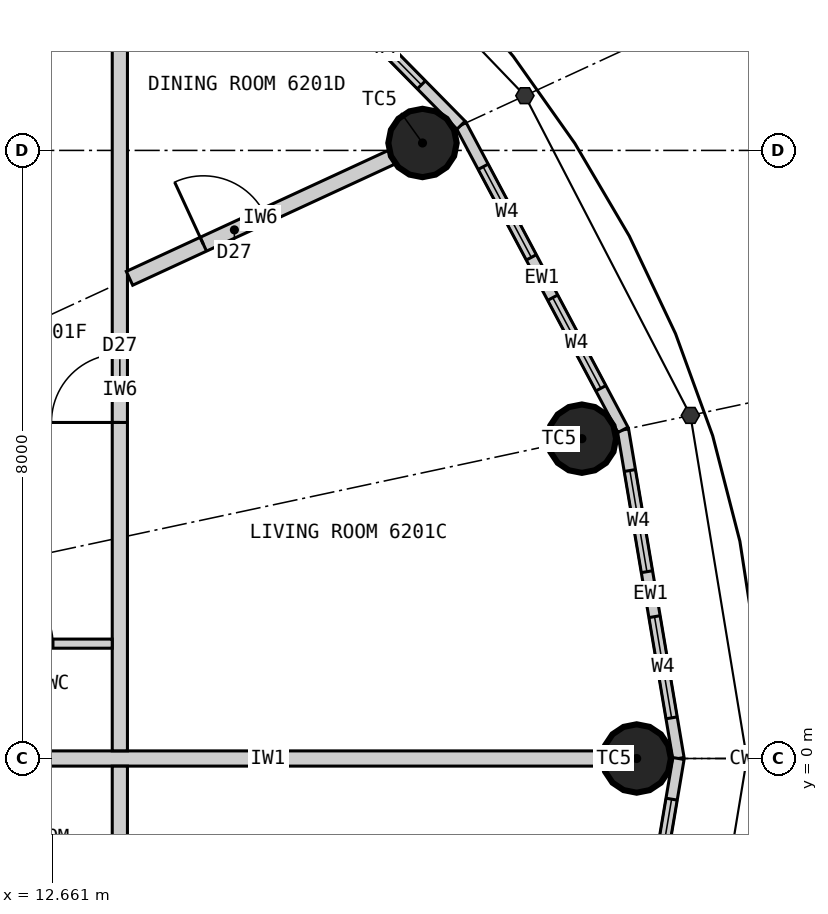
"""IFC4 building model, lengths in metres.
Left out: names, types, materials, properties, quantities, classifications, styles, units other than length and angle.
Written with IfcOpenShell. Run it as: python <this file> out.ifc"""

import sys

from ifc_helpers import new_model, si_unit, direction, frame, frame_2d, origin, origin_2d, place, context, subcontext, project, spatial, rectangle, circle, extrude, clip, halfspace, element, fill, save


model = new_model("IFC4")
c1 = context("Model", 3, precision=1e-05, world=origin(), true_north=direction((0.0, 1.0)))
c2 = subcontext(c1, "Body", "Model", "MODEL_VIEW")
j1 = project(units=[si_unit("LENGTHUNIT", "METRE"), si_unit("PLANEANGLEUNIT", "RADIAN")], contexts=[c1])
p1 = place(None, origin())
s1 = spatial("IfcSite", under=j1, at=p1, CompositionType="ELEMENT")
p2 = place(p1, origin())
s2 = spatial("IfcBuilding", under=s1, at=p2, CompositionType="ELEMENT")
p3 = place(p2, frame((0.0, 0.0, 229.2)))
s3 = spatial("IfcBuildingStorey", under=s2, at=p3, CompositionType="ELEMENT", Elevation=229.2)
for number, where, z_axis, x_axis in (
    (1, (20.35, 0.0, 0.0), (0.0, 0.0, 1.0), (1.0, 0.0, 0.0)),
    (2, (19.629, 4.208, 0.0), (0.0, 0.0, 1.0), (1.0, 0.0, 0.0)),
    (3, (17.532, 8.098, 0.0), (0.0, 0.0, 1.0), (1.0, 0.0, 0.0)),
):
    element("IfcColumn", number, at=place(p3, frame(where, z_axis=z_axis, x_axis=x_axis)), inside=s3, PredefinedType="COLUMN", context=c2, shape_type="Clipping", body=[
        clip(extrude(circle(Radius=0.45, at=origin_2d()), origin(), (0.0, 0.0, 1.0), 3.3), halfspace(frame((0.0, 0.0, 2.25), z_axis=(0.0, 0.0, 1.0), x_axis=(1.0, 0.0, 0.0)), False)),
    ])
p4 = place(p3, frame((20.9, 0.0, 0.0), z_axis=(0.0, 0.0, 1.0), x_axis=(-0.166538513568, 0.986034950445, 0.0)))
e4 = element("IfcWall", 4, at=p4, inside=s3, PredefinedType="ELEMENTEDWALL", context=c2, shape_type="SweptSolid", body=[
    extrude(rectangle(XDim=4.385, YDim=0.15, at=frame_2d((2.192, 0.0))), origin(), (0.0, 0.0, 1.0), 3.05),
])
p5 = place(p4, frame((0.542, 0.0, 0.9)))
e5 = element("IfcOpeningElement", 5, at=p5, cuts=e4, PredefinedType="OPENING", context=c2, shape_type="SweptSolid", body=[
    extrude(rectangle(XDim=1.35, YDim=1.9, at=frame_2d((0.675, 0.95))), frame((0.0, 0.085, 0.0), z_axis=(0.0, -1.0, 0.0), x_axis=(1.0, 0.0, 0.0)), (0.0, 0.0, 1.0), 0.17),
])
p6 = place(p4, frame((2.492, 0.0, 0.9)))
e6 = element("IfcOpeningElement", 6, at=p6, cuts=e4, PredefinedType="OPENING", context=c2, shape_type="SweptSolid", body=[
    extrude(rectangle(XDim=1.35, YDim=1.9, at=frame_2d((0.675, 0.95))), frame((0.0, 0.085, 0.0), z_axis=(0.0, -1.0, 0.0), x_axis=(1.0, 0.0, 0.0)), (0.0, 0.0, 1.0), 0.17),
])
p7 = place(p3, frame((20.17, 4.323, 0.0), z_axis=(0.0, 0.0, 1.0), x_axis=(-0.469256152955, 0.883062094597, 0.0)))
e7 = element("IfcWall", 7, at=p7, inside=s3, PredefinedType="ELEMENTEDWALL", context=c2, shape_type="SweptSolid", body=[
    extrude(rectangle(XDim=4.539, YDim=0.15, at=frame_2d((2.27, 0.0))), origin(), (0.0, 0.0, 1.0), 3.05),
])
p8 = place(p7, frame((0.62, 0.0, 0.9)))
e8 = element("IfcOpeningElement", 8, at=p8, cuts=e7, PredefinedType="OPENING", context=c2, shape_type="SweptSolid", body=[
    extrude(rectangle(XDim=1.35, YDim=1.9, at=frame_2d((0.675, 0.95))), frame((0.0, 0.085, 0.0), z_axis=(0.0, -1.0, 0.0), x_axis=(1.0, 0.0, 0.0)), (0.0, 0.0, 1.0), 0.17),
])
p9 = place(p7, frame((2.57, 0.0, 0.9)))
e9 = element("IfcOpeningElement", 9, at=p9, cuts=e7, PredefinedType="OPENING", context=c2, shape_type="SweptSolid", body=[
    extrude(rectangle(XDim=1.35, YDim=1.9, at=frame_2d((0.675, 0.95))), frame((0.0, 0.085, 0.0), z_axis=(0.0, -1.0, 0.0), x_axis=(1.0, 0.0, 0.0)), (0.0, 0.0, 1.0), 0.17),
])
p10 = place(p3, frame((18.04, 8.332, 0.0), z_axis=(0.0, 0.0, 1.0), x_axis=(-0.701527379618, 0.712642501993, 0.0)))
e10 = element("IfcWall", 10, at=p10, inside=s3, PredefinedType="ELEMENTEDWALL", context=c2, shape_type="SweptSolid", body=[
    extrude(rectangle(XDim=4.788, YDim=0.15, at=frame_2d((2.394, 0.0))), origin(), (0.0, 0.0, 1.0), 3.05),
])
p11 = place(p10, frame((0.744, 0.0, 0.9)))
e11 = element("IfcOpeningElement", 11, at=p11, cuts=e10, PredefinedType="OPENING", context=c2, shape_type="SweptSolid", body=[
    extrude(rectangle(XDim=1.35, YDim=1.9, at=frame_2d((0.675, 0.95))), frame((0.0, 0.085, 0.0), z_axis=(0.0, -1.0, 0.0), x_axis=(1.0, 0.0, 0.0)), (0.0, 0.0, 1.0), 0.17),
])
p12 = place(p10, frame((2.694, 0.0, 0.9)))
e12 = element("IfcOpeningElement", 12, at=p12, cuts=e10, PredefinedType="OPENING", context=c2, shape_type="SweptSolid", body=[
    extrude(rectangle(XDim=1.35, YDim=1.9, at=frame_2d((0.675, 0.95))), frame((0.0, 0.085, 0.0), z_axis=(0.0, -1.0, 0.0), x_axis=(1.0, 0.0, 0.0)), (0.0, 0.0, 1.0), 0.17),
])
p13 = place(p3, frame((20.17, -4.323, 0.0), z_axis=(0.0, 0.0, 1.0), x_axis=(0.166538513568, 0.986034950445, 0.0)))
e13 = element("IfcWall", 13, at=p13, inside=s3, PredefinedType="ELEMENTEDWALL", context=c2, shape_type="SweptSolid", body=[
    extrude(rectangle(XDim=4.385, YDim=0.15, at=frame_2d((2.192, 0.0))), origin(), (0.0, 0.0, 1.0), 3.05),
])
p14 = place(p13, frame((0.542, 0.0, 0.9)))
e14 = element("IfcOpeningElement", 14, at=p14, cuts=e13, PredefinedType="OPENING", context=c2, shape_type="SweptSolid", body=[
    extrude(rectangle(XDim=1.35, YDim=1.9, at=frame_2d((0.675, 0.95))), frame((0.0, 0.085, 0.0), z_axis=(0.0, -1.0, 0.0), x_axis=(1.0, 0.0, 0.0)), (0.0, 0.0, 1.0), 0.17),
])
p15 = place(p13, frame((2.492, 0.0, 0.9)))
e15 = element("IfcOpeningElement", 15, at=p15, cuts=e13, PredefinedType="OPENING", context=c2, shape_type="SweptSolid", body=[
    extrude(rectangle(XDim=1.35, YDim=1.9, at=frame_2d((0.675, 0.95))), frame((0.0, 0.085, 0.0), z_axis=(0.0, -1.0, 0.0), x_axis=(1.0, 0.0, 0.0)), (0.0, 0.0, 1.0), 0.17),
])
p16 = place(p3, frame((11.1, 0.0, 0.0), z_axis=(0.0, 0.0, 1.0), x_axis=(1.0, 0.0, 0.0)))
e16 = element("IfcWall", 16, at=p16, inside=s3, PredefinedType="PARTITIONING", context=c2, shape_type="SweptSolid", body=[
    extrude(rectangle(XDim=8.8, YDim=0.2, at=frame_2d((4.4, 0.0))), origin(), (0.0, 0.0, 1.0), 2.15),
])
p17 = place(p3, frame((13.55, 0.101, 0.0), z_axis=(0.0, 0.0, 1.0), x_axis=(0.0, 1.0, 0.0)))
e17 = element("IfcWall", 17, at=p17, inside=s3, PredefinedType="PARTITIONING", context=c2, shape_type="SweptSolid", body=[
    extrude(rectangle(XDim=9.508, YDim=0.2, at=frame_2d((4.754, 0.0))), origin(), (0.0, 0.0, 1.0), 3.05),
])
p18 = place(p17, frame((4.32, 0.0, 0.0)))
e18 = element("IfcOpeningElement", 18, at=p18, cuts=e17, PredefinedType="OPENING", context=c2, shape_type="SweptSolid", body=[
    extrude(rectangle(XDim=0.9, YDim=2.1, at=frame_2d((0.45, 1.05))), frame((0.0, 0.11, 0.0), z_axis=(0.0, -1.0, 0.0), x_axis=(1.0, 0.0, 0.0)), (0.0, 0.0, 1.0), 0.22),
])
p19 = place(p3, frame((13.677, 6.317, 0.0), z_axis=(0.0, 0.0, 1.0), x_axis=(0.907825704695, 0.419347695708, 0.0)))
e19 = element("IfcWall", 19, at=p19, inside=s3, PredefinedType="PARTITIONING", context=c2, shape_type="SweptSolid", body=[
    extrude(rectangle(XDim=3.796, YDim=0.2, at=frame_2d((1.898, 0.0))), origin(), (0.0, 0.0, 1.0), 2.15),
])
p20 = place(p19, frame((1.07, 0.0, 0.0)))
e20 = element("IfcOpeningElement", 20, at=p20, cuts=e19, PredefinedType="OPENING", context=c2, shape_type="SweptSolid", body=[
    extrude(rectangle(XDim=0.9, YDim=2.1, at=frame_2d((0.45, 1.05))), frame((0.0, 0.11, 0.0), z_axis=(0.0, -1.0, 0.0), x_axis=(1.0, 0.0, 0.0)), (0.0, 0.0, 1.0), 0.22),
])
p21 = place(p3, frame((11.1, 1.511, 0.0), z_axis=(0.0, 0.0, 1.0), x_axis=(1.0, 0.0, 0.0)))
e21 = element("IfcWall", 21, at=p21, inside=s3, PredefinedType="PARTITIONING", context=c2, shape_type="SweptSolid", body=[
    extrude(rectangle(XDim=2.35, YDim=0.12, at=frame_2d((1.175, 0.0))), origin(), (0.0, 0.0, 1.0), 2.3),
])
p22 = place(p21, frame((0.77, 0.0, 0.0)))
e22 = element("IfcOpeningElement", 22, at=p22, cuts=e21, PredefinedType="OPENING", context=c2, shape_type="SweptSolid", body=[
    extrude(rectangle(XDim=0.8, YDim=2.1, at=frame_2d((0.4, 1.05))), frame((0.0, 0.07, 0.0), z_axis=(0.0, -1.0, 0.0), x_axis=(1.0, 0.0, 0.0)), (0.0, 0.0, 1.0), 0.14),
])
p23 = place(p3, frame((13.55, -9.609, 0.0), z_axis=(0.0, 0.0, 1.0), x_axis=(0.0, 1.0, 0.0)))
e23 = element("IfcWall", 23, at=p23, inside=s3, PredefinedType="PARTITIONING", context=c2, shape_type="SweptSolid", body=[
    extrude(rectangle(XDim=9.508, YDim=0.2, at=frame_2d((4.754, 0.0))), origin(), (0.0, 0.0, 1.0), 3.05),
])
p24 = place(p23, frame((3.77, 0.0, 0.0)))
e24 = element("IfcOpeningElement", 24, at=p24, cuts=e23, PredefinedType="OPENING", context=c2, shape_type="SweptSolid", body=[
    extrude(rectangle(XDim=0.9, YDim=2.1, at=frame_2d((0.45, 1.05))), frame((0.0, 0.11, 0.0), z_axis=(0.0, -1.0, 0.0), x_axis=(1.0, 0.0, 0.0)), (0.0, 0.0, 1.0), 0.22),
])
p25 = place(p23, frame((5.588, 0.0, 0.0)))
e25 = element("IfcOpeningElement", 25, at=p25, cuts=e23, PredefinedType="OPENING", context=c2, shape_type="SweptSolid", body=[
    extrude(rectangle(XDim=0.9, YDim=2.1, at=frame_2d((0.45, 1.05))), frame((0.0, 0.11, 0.0), z_axis=(0.0, -1.0, 0.0), x_axis=(1.0, 0.0, 0.0)), (0.0, 0.0, 1.0), 0.22),
])
p26 = place(p23, frame((7.308, 0.0, 0.0)))
e26 = element("IfcOpeningElement", 26, at=p26, cuts=e23, PredefinedType="OPENING", context=c2, shape_type="SweptSolid", body=[
    extrude(rectangle(XDim=0.8, YDim=2.1, at=frame_2d((0.4, 1.05))), frame((0.0, 0.11, 0.0), z_axis=(0.0, -1.0, 0.0), x_axis=(1.0, 0.0, 0.0)), (0.0, 0.0, 1.0), 0.22),
])
p27 = place(p5, origin())
e27 = element("IfcWindow", 27, at=p27, inside=s3, PartitioningType="SINGLE_PANEL", PredefinedType="WINDOW", context=c2, shape_type="SweptSolid", body=[
    extrude(rectangle(XDim=1.35, YDim=1.9, at=frame_2d((0.675, 0.95))), frame((0.0, 0.03, 0.0), z_axis=(0.0, -1.0, 0.0), x_axis=(1.0, 0.0, 0.0)), (0.0, 0.0, 1.0), 0.06),
])
fill(e5, e27)
p28 = place(p6, origin())
e28 = element("IfcWindow", 28, at=p28, inside=s3, PartitioningType="SINGLE_PANEL", PredefinedType="WINDOW", context=c2, shape_type="SweptSolid", body=[
    extrude(rectangle(XDim=1.35, YDim=1.9, at=frame_2d((0.675, 0.95))), frame((0.0, 0.03, 0.0), z_axis=(0.0, -1.0, 0.0), x_axis=(1.0, 0.0, 0.0)), (0.0, 0.0, 1.0), 0.06),
])
fill(e6, e28)
p29 = place(p8, origin())
e29 = element("IfcWindow", 29, at=p29, inside=s3, PartitioningType="SINGLE_PANEL", PredefinedType="WINDOW", context=c2, shape_type="SweptSolid", body=[
    extrude(rectangle(XDim=1.35, YDim=1.9, at=frame_2d((0.675, 0.95))), frame((0.0, 0.03, 0.0), z_axis=(0.0, -1.0, 0.0), x_axis=(1.0, 0.0, 0.0)), (0.0, 0.0, 1.0), 0.06),
])
fill(e8, e29)
p30 = place(p9, origin())
e30 = element("IfcWindow", 30, at=p30, inside=s3, PartitioningType="SINGLE_PANEL", PredefinedType="WINDOW", context=c2, shape_type="SweptSolid", body=[
    extrude(rectangle(XDim=1.35, YDim=1.9, at=frame_2d((0.675, 0.95))), frame((0.0, 0.03, 0.0), z_axis=(0.0, -1.0, 0.0), x_axis=(1.0, 0.0, 0.0)), (0.0, 0.0, 1.0), 0.06),
])
fill(e9, e30)
p31 = place(p11, origin())
e31 = element("IfcWindow", 31, at=p31, inside=s3, PartitioningType="SINGLE_PANEL", PredefinedType="WINDOW", context=c2, shape_type="SweptSolid", body=[
    extrude(rectangle(XDim=1.35, YDim=1.9, at=frame_2d((0.675, 0.95))), frame((0.0, 0.03, 0.0), z_axis=(0.0, -1.0, 0.0), x_axis=(1.0, 0.0, 0.0)), (0.0, 0.0, 1.0), 0.06),
])
fill(e11, e31)
p32 = place(p15, origin())
e32 = element("IfcWindow", 32, at=p32, inside=s3, PartitioningType="SINGLE_PANEL", PredefinedType="WINDOW", context=c2, shape_type="SweptSolid", body=[
    extrude(rectangle(XDim=1.35, YDim=1.9, at=frame_2d((0.675, 0.95))), frame((0.0, 0.03, 0.0), z_axis=(0.0, -1.0, 0.0), x_axis=(1.0, 0.0, 0.0)), (0.0, 0.0, 1.0), 0.06),
])
fill(e15, e32)
p33 = place(p22, origin())
e33 = element("IfcDoor", 33, at=p33, inside=s3, OperationType="SINGLE_SWING_LEFT", PredefinedType="DOOR", context=c2, shape_type="SweptSolid", body=[
    extrude(rectangle(XDim=0.8, YDim=2.1, at=frame_2d((0.4, 1.05))), frame((0.0, 0.025, 0.0), z_axis=(0.0, -1.0, 0.0), x_axis=(1.0, 0.0, 0.0)), (0.0, 0.0, 1.0), 0.05),
])
fill(e22, e33)
p34 = place(p18, origin())
e34 = element("IfcDoor", 34, at=p34, inside=s3, OperationType="SINGLE_SWING_LEFT", PredefinedType="DOOR", context=c2, shape_type="SweptSolid", body=[
    extrude(rectangle(XDim=0.9, YDim=2.1, at=frame_2d((0.45, 1.05))), frame((0.0, 0.025, 0.0), z_axis=(0.0, -1.0, 0.0), x_axis=(1.0, 0.0, 0.0)), (0.0, 0.0, 1.0), 0.05),
])
fill(e18, e34)
p35 = place(p20, origin())
e35 = element("IfcDoor", 35, at=p35, inside=s3, OperationType="SINGLE_SWING_LEFT", PredefinedType="DOOR", context=c2, shape_type="SweptSolid", body=[
    extrude(rectangle(XDim=0.9, YDim=2.1, at=frame_2d((0.45, 1.05))), frame((0.0, 0.025, 0.0), z_axis=(0.0, -1.0, 0.0), x_axis=(1.0, 0.0, 0.0)), (0.0, 0.0, 1.0), 0.05),
])
fill(e20, e35)
save(model, sys.argv[1])
